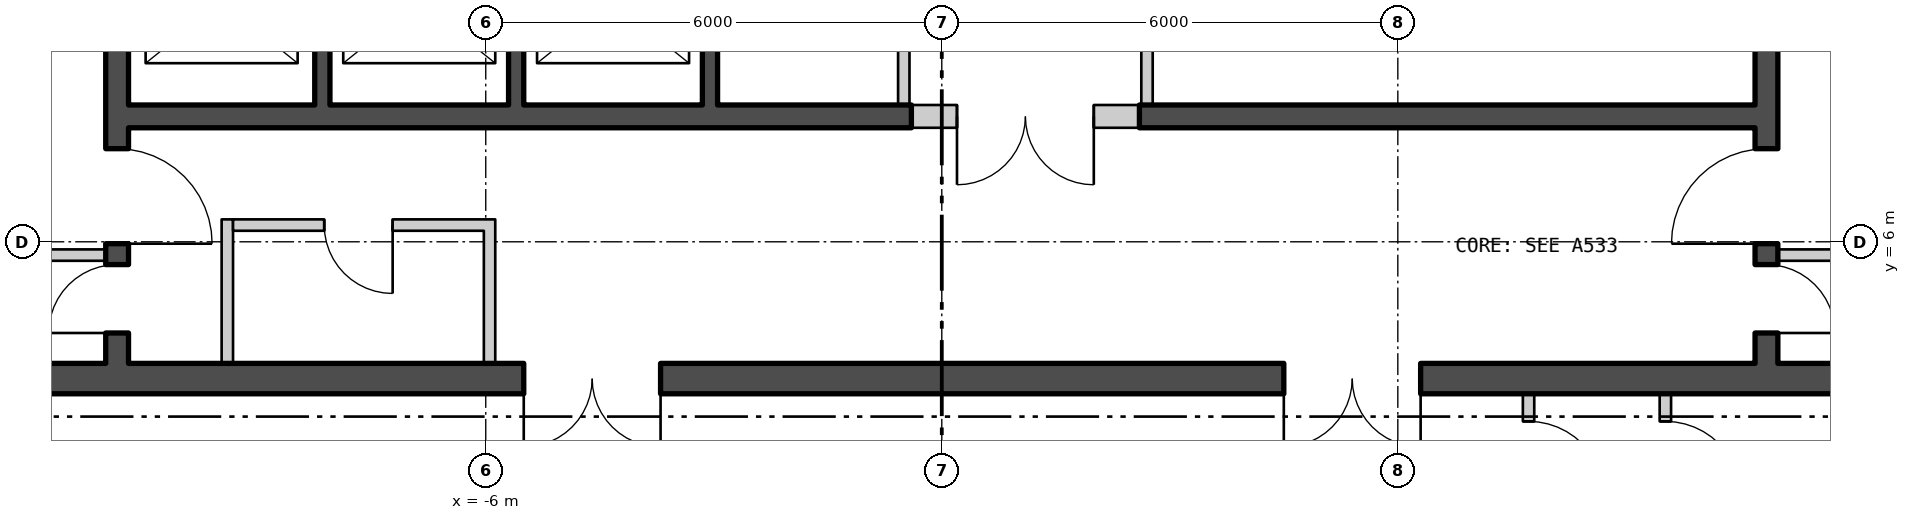
"""IFC4 building model, lengths in metres.
Left out: names, types, materials, properties, quantities, classifications, styles, units other than length and angle.
Written with IfcOpenShell. Run it as: python <this file> out.ifc"""

import sys

from ifc_helpers import new_model, si_unit, direction, frame, frame_2d, origin, place, context, subcontext, project, spatial, polyline, rectangle, outline, extrude, element, fill, save


model = new_model("IFC4")
c1 = context("Model", 3, precision=1e-05, world=origin(), true_north=direction((0.0, 1.0)))
c2 = subcontext(c1, "Body", "Model", "MODEL_VIEW")
j1 = project(units=[si_unit("LENGTHUNIT", "METRE"), si_unit("PLANEANGLEUNIT", "RADIAN")], contexts=[c1])
p1 = place(None, origin())
s1 = spatial("IfcSite", under=j1, at=p1, CompositionType="ELEMENT")
p2 = place(p1, origin())
s2 = spatial("IfcBuilding", under=s1, at=p2, CompositionType="ELEMENT")
p3 = place(p2, frame((0.0, 0.0, 280.5)))
s3 = spatial("IfcBuildingStorey", under=s2, at=p3, CompositionType="ELEMENT", Elevation=280.5)
p4 = place(p3, frame((-25.385, 15.619, -0.18), z_axis=(0.0, 0.0, 1.0), x_axis=(0.500000711659, -0.866024992908, 0.0)))
e1 = element("IfcWall", 1, at=p4, inside=s3, PredefinedType="SOLIDWALL", context=c2, shape_type="SweptSolid", body=[
    extrude(outline(polyline([(-0.13, -0.225), (45.87, -0.225), (45.61, 0.225), (0.13, 0.225), (-0.13, -0.225)])), origin(), (0.0, 0.0, 1.0), 3.68),
])
p5 = place(p4, frame((1.424, 0.0, 1.08)))
e2 = element("IfcOpeningElement", 2, at=p5, cuts=e1, PredefinedType="OPENING", context=c2, shape_type="SweptSolid", body=[
    extrude(rectangle(XDim=2.4, YDim=2.0, at=frame_2d((1.2, 1.0))), frame((0.0, 0.235, 0.0), z_axis=(0.0, -1.0, 0.0), x_axis=(1.0, 0.0, 0.0)), (0.0, 0.0, 1.0), 0.47),
])
p6 = place(p4, frame((5.893, 0.0, 1.08)))
e3 = element("IfcOpeningElement", 3, at=p6, cuts=e1, PredefinedType="OPENING", context=c2, shape_type="SweptSolid", body=[
    extrude(rectangle(XDim=2.4, YDim=2.0, at=frame_2d((1.2, 1.0))), frame((0.0, 0.235, 0.0), z_axis=(0.0, -1.0, 0.0), x_axis=(1.0, 0.0, 0.0)), (0.0, 0.0, 1.0), 0.47),
])
p7 = place(p4, frame((10.401, 0.0, 1.08)))
e4 = element("IfcOpeningElement", 4, at=p7, cuts=e1, PredefinedType="OPENING", context=c2, shape_type="SweptSolid", body=[
    extrude(rectangle(XDim=2.4, YDim=2.0, at=frame_2d((1.2, 1.0))), frame((0.0, 0.235, 0.0), z_axis=(0.0, -1.0, 0.0), x_axis=(1.0, 0.0, 0.0)), (0.0, 0.0, 1.0), 0.47),
])
p8 = place(p4, frame((14.909, 0.0, 1.08)))
e5 = element("IfcOpeningElement", 5, at=p8, cuts=e1, PredefinedType="OPENING", context=c2, shape_type="SweptSolid", body=[
    extrude(rectangle(XDim=2.4, YDim=2.0, at=frame_2d((1.2, 1.0))), frame((0.0, 0.235, 0.0), z_axis=(0.0, -1.0, 0.0), x_axis=(1.0, 0.0, 0.0)), (0.0, 0.0, 1.0), 0.47),
])
p9 = place(p4, frame((19.416, 0.0, 1.08)))
e6 = element("IfcOpeningElement", 6, at=p9, cuts=e1, PredefinedType="OPENING", context=c2, shape_type="SweptSolid", body=[
    extrude(rectangle(XDim=2.4, YDim=2.0, at=frame_2d((1.2, 1.0))), frame((0.0, 0.235, 0.0), z_axis=(0.0, -1.0, 0.0), x_axis=(1.0, 0.0, 0.0)), (0.0, 0.0, 1.0), 0.47),
])
p10 = place(p4, frame((23.924, 0.0, 1.08)))
e7 = element("IfcOpeningElement", 7, at=p10, cuts=e1, PredefinedType="OPENING", context=c2, shape_type="SweptSolid", body=[
    extrude(rectangle(XDim=2.4, YDim=2.0, at=frame_2d((1.2, 1.0))), frame((0.0, 0.235, 0.0), z_axis=(0.0, -1.0, 0.0), x_axis=(1.0, 0.0, 0.0)), (0.0, 0.0, 1.0), 0.47),
])
p11 = place(p4, frame((28.431, 0.0, 1.08)))
e8 = element("IfcOpeningElement", 8, at=p11, cuts=e1, PredefinedType="OPENING", context=c2, shape_type="SweptSolid", body=[
    extrude(rectangle(XDim=2.4, YDim=2.0, at=frame_2d((1.2, 1.0))), frame((0.0, 0.235, 0.0), z_axis=(0.0, -1.0, 0.0), x_axis=(1.0, 0.0, 0.0)), (0.0, 0.0, 1.0), 0.47),
])
p12 = place(p4, frame((32.939, 0.0, 1.08)))
e9 = element("IfcOpeningElement", 9, at=p12, cuts=e1, PredefinedType="OPENING", context=c2, shape_type="SweptSolid", body=[
    extrude(rectangle(XDim=2.4, YDim=2.0, at=frame_2d((1.2, 1.0))), frame((0.0, 0.235, 0.0), z_axis=(0.0, -1.0, 0.0), x_axis=(1.0, 0.0, 0.0)), (0.0, 0.0, 1.0), 0.47),
])
p13 = place(p4, frame((37.447, 0.0, 1.08)))
e10 = element("IfcOpeningElement", 10, at=p13, cuts=e1, PredefinedType="OPENING", context=c2, shape_type="SweptSolid", body=[
    extrude(rectangle(XDim=2.4, YDim=2.0, at=frame_2d((1.2, 1.0))), frame((0.0, 0.235, 0.0), z_axis=(0.0, -1.0, 0.0), x_axis=(1.0, 0.0, 0.0)), (0.0, 0.0, 1.0), 0.47),
])
p14 = place(p4, frame((41.916, 0.0, 1.08)))
e11 = element("IfcOpeningElement", 11, at=p14, cuts=e1, PredefinedType="OPENING", context=c2, shape_type="SweptSolid", body=[
    extrude(rectangle(XDim=2.4, YDim=2.0, at=frame_2d((1.2, 1.0))), frame((0.0, 0.235, 0.0), z_axis=(0.0, -1.0, 0.0), x_axis=(1.0, 0.0, 0.0)), (0.0, 0.0, 1.0), 0.47),
])
p15 = place(p3, frame((2.515, -23.993, -0.18), z_axis=(0.0, 0.0, 1.0), x_axis=(0.500000711659, 0.866024992908, 0.0)))
e12 = element("IfcWall", 12, at=p15, inside=s3, PredefinedType="SOLIDWALL", context=c2, shape_type="SweptSolid", body=[
    extrude(outline(polyline([(-0.13, -0.225), (45.87, -0.225), (45.61, 0.225), (0.13, 0.225), (-0.13, -0.225)])), origin(), (0.0, 0.0, 1.0), 3.68),
])
p16 = place(p15, frame((1.424, 0.0, 1.08)))
e13 = element("IfcOpeningElement", 13, at=p16, cuts=e12, PredefinedType="OPENING", context=c2, shape_type="SweptSolid", body=[
    extrude(rectangle(XDim=2.4, YDim=2.0, at=frame_2d((1.2, 1.0))), frame((0.0, 0.235, 0.0), z_axis=(0.0, -1.0, 0.0), x_axis=(1.0, 0.0, 0.0)), (0.0, 0.0, 1.0), 0.47),
])
p17 = place(p15, frame((5.893, 0.0, 1.08)))
e14 = element("IfcOpeningElement", 14, at=p17, cuts=e12, PredefinedType="OPENING", context=c2, shape_type="SweptSolid", body=[
    extrude(rectangle(XDim=2.4, YDim=2.0, at=frame_2d((1.2, 1.0))), frame((0.0, 0.235, 0.0), z_axis=(0.0, -1.0, 0.0), x_axis=(1.0, 0.0, 0.0)), (0.0, 0.0, 1.0), 0.47),
])
p18 = place(p15, frame((10.401, 0.0, 1.08)))
e15 = element("IfcOpeningElement", 15, at=p18, cuts=e12, PredefinedType="OPENING", context=c2, shape_type="SweptSolid", body=[
    extrude(rectangle(XDim=2.4, YDim=2.0, at=frame_2d((1.2, 1.0))), frame((0.0, 0.235, 0.0), z_axis=(0.0, -1.0, 0.0), x_axis=(1.0, 0.0, 0.0)), (0.0, 0.0, 1.0), 0.47),
])
p19 = place(p15, frame((14.909, 0.0, 1.08)))
e16 = element("IfcOpeningElement", 16, at=p19, cuts=e12, PredefinedType="OPENING", context=c2, shape_type="SweptSolid", body=[
    extrude(rectangle(XDim=2.4, YDim=2.0, at=frame_2d((1.2, 1.0))), frame((0.0, 0.235, 0.0), z_axis=(0.0, -1.0, 0.0), x_axis=(1.0, 0.0, 0.0)), (0.0, 0.0, 1.0), 0.47),
])
p20 = place(p15, frame((19.416, 0.0, 1.08)))
e17 = element("IfcOpeningElement", 17, at=p20, cuts=e12, PredefinedType="OPENING", context=c2, shape_type="SweptSolid", body=[
    extrude(rectangle(XDim=2.4, YDim=2.0, at=frame_2d((1.2, 1.0))), frame((0.0, 0.235, 0.0), z_axis=(0.0, -1.0, 0.0), x_axis=(1.0, 0.0, 0.0)), (0.0, 0.0, 1.0), 0.47),
])
p21 = place(p15, frame((28.431, 0.0, 1.08)))
e18 = element("IfcOpeningElement", 18, at=p21, cuts=e12, PredefinedType="OPENING", context=c2, shape_type="SweptSolid", body=[
    extrude(rectangle(XDim=2.4, YDim=2.0, at=frame_2d((1.2, 1.0))), frame((0.0, 0.235, 0.0), z_axis=(0.0, -1.0, 0.0), x_axis=(1.0, 0.0, 0.0)), (0.0, 0.0, 1.0), 0.47),
])
p22 = place(p15, frame((37.447, 0.0, 1.08)))
e19 = element("IfcOpeningElement", 19, at=p22, cuts=e12, PredefinedType="OPENING", context=c2, shape_type="SweptSolid", body=[
    extrude(rectangle(XDim=2.4, YDim=2.0, at=frame_2d((1.2, 1.0))), frame((0.0, 0.235, 0.0), z_axis=(0.0, -1.0, 0.0), x_axis=(1.0, 0.0, 0.0)), (0.0, 0.0, 1.0), 0.47),
])
p23 = place(p15, frame((41.916, 0.0, 1.08)))
e20 = element("IfcOpeningElement", 20, at=p23, cuts=e12, PredefinedType="OPENING", context=c2, shape_type="SweptSolid", body=[
    extrude(rectangle(XDim=2.4, YDim=2.0, at=frame_2d((1.2, 1.0))), frame((0.0, 0.235, 0.0), z_axis=(0.0, -1.0, 0.0), x_axis=(1.0, 0.0, 0.0)), (0.0, 0.0, 1.0), 0.47),
])
p24 = place(p3, frame((-14.5, 4.2, 0.0), z_axis=(0.0, 0.0, 1.0), x_axis=(1.0, 0.0, 0.0)))
e21 = element("IfcWall", 21, at=p24, inside=s3, PredefinedType="SHEAR", context=c2, shape_type="SweptSolid", body=[
    extrude(rectangle(XDim=29.0, YDim=0.4, at=frame_2d((14.5, 0.0))), origin(), (0.0, 0.0, 1.0), 3.7),
])
p25 = place(p24, frame((9.0, 0.0, 0.0)))
e22 = element("IfcOpeningElement", 22, at=p25, cuts=e21, PredefinedType="OPENING", context=c2, shape_type="SweptSolid", body=[
    extrude(rectangle(XDim=1.8, YDim=2.4, at=frame_2d((0.9, 1.2))), frame((0.0, 0.21, 0.0), z_axis=(0.0, -1.0, 0.0), x_axis=(1.0, 0.0, 0.0)), (0.0, 0.0, 1.0), 0.42),
])
p26 = place(p24, frame((19.0, 0.0, 0.0)))
e23 = element("IfcOpeningElement", 23, at=p26, cuts=e21, PredefinedType="OPENING", context=c2, shape_type="SweptSolid", body=[
    extrude(rectangle(XDim=1.8, YDim=2.4, at=frame_2d((0.9, 1.2))), frame((0.0, 0.21, 0.0), z_axis=(0.0, -1.0, 0.0), x_axis=(1.0, 0.0, 0.0)), (0.0, 0.0, 1.0), 0.42),
])
p27 = place(p3, frame((-10.85, 4.4, 0.0), z_axis=(0.0, 0.0, 1.0), x_axis=(0.0, 1.0, 0.0)))
e24 = element("IfcWall", 24, at=p27, inside=s3, PredefinedType="SHEAR", context=c2, shape_type="SweptSolid", body=[
    extrude(rectangle(XDim=13.2, YDim=0.3, at=frame_2d((6.6, 0.0))), origin(), (0.0, 0.0, 1.0), 3.7),
])
p28 = place(p27, frame((1.575, 0.0, 0.0)))
e25 = element("IfcOpeningElement", 25, at=p28, cuts=e24, PredefinedType="OPENING", context=c2, shape_type="SweptSolid", body=[
    extrude(rectangle(XDim=1.25, YDim=2.1, at=frame_2d((0.625, 1.05))), frame((0.0, 0.16, 0.0), z_axis=(0.0, -1.0, 0.0), x_axis=(1.0, 0.0, 0.0)), (0.0, 0.0, 1.0), 0.32),
])
p29 = place(p27, frame((0.4, 0.0, 0.0)))
e26 = element("IfcOpeningElement", 26, at=p29, cuts=e24, PredefinedType="OPENING", context=c2, shape_type="SweptSolid", body=[
    extrude(rectangle(XDim=0.9, YDim=2.1, at=frame_2d((0.45, 1.05))), frame((0.0, 0.16, 0.0), z_axis=(0.0, -1.0, 0.0), x_axis=(1.0, 0.0, 0.0)), (0.0, 0.0, 1.0), 0.32),
])
p30 = place(p3, frame((10.85, 4.4, 0.0), z_axis=(0.0, 0.0, 1.0), x_axis=(0.0, 1.0, 0.0)))
e27 = element("IfcWall", 27, at=p30, inside=s3, PredefinedType="SHEAR", context=c2, shape_type="SweptSolid", body=[
    extrude(rectangle(XDim=13.2, YDim=0.3, at=frame_2d((6.6, 0.0))), origin(), (0.0, 0.0, 1.0), 3.7),
])
p31 = place(p30, frame((1.575, 0.0, 0.0)))
e28 = element("IfcOpeningElement", 28, at=p31, cuts=e27, PredefinedType="OPENING", context=c2, shape_type="SweptSolid", body=[
    extrude(rectangle(XDim=1.25, YDim=2.1, at=frame_2d((0.625, 1.05))), frame((0.0, 0.16, 0.0), z_axis=(0.0, -1.0, 0.0), x_axis=(1.0, 0.0, 0.0)), (0.0, 0.0, 1.0), 0.32),
])
p32 = place(p30, frame((0.4, 0.0, 0.0)))
e29 = element("IfcOpeningElement", 29, at=p32, cuts=e27, PredefinedType="OPENING", context=c2, shape_type="SweptSolid", body=[
    extrude(rectangle(XDim=0.9, YDim=2.1, at=frame_2d((0.45, 1.05))), frame((0.0, 0.16, 0.0), z_axis=(0.0, -1.0, 0.0), x_axis=(1.0, 0.0, 0.0)), (0.0, 0.0, 1.0), 0.32),
])
p33 = place(p3, frame((-10.7, 7.65, 0.0), z_axis=(0.0, 0.0, 1.0), x_axis=(1.0, 0.0, 0.0)))
e30 = element("IfcWall", 30, at=p33, inside=s3, PredefinedType="SHEAR", context=c2, shape_type="SweptSolid", body=[
    extrude(rectangle(XDim=10.3, YDim=0.3, at=frame_2d((5.15, 0.0))), origin(), (0.0, 0.0, 1.0), 3.7),
])
p34 = place(p3, frame((2.6, 7.65, 0.0), z_axis=(0.0, 0.0, 1.0), x_axis=(1.0, 0.0, 0.0)))
e31 = element("IfcWall", 31, at=p34, inside=s3, PredefinedType="SHEAR", context=c2, shape_type="SweptSolid", body=[
    extrude(rectangle(XDim=8.1, YDim=0.3, at=frame_2d((4.05, 0.0))), origin(), (0.0, 0.0, 1.0), 3.7),
])
for number, where, z_axis, x_axis in (
    (32, (-8.15, 7.8, 0.0), (0.0, 0.0, 1.0), (0.0, 1.0, 0.0)),
    (33, (-5.6, 7.8, 0.0), (0.0, 0.0, 1.0), (0.0, 1.0, 0.0)),
    (34, (-3.05, 7.8, 0.0), (0.0, 0.0, 1.0), (0.0, 1.0, 0.0)),
):
    element("IfcWall", number, at=place(p3, frame(where, z_axis=z_axis, x_axis=x_axis)), inside=s3, PredefinedType="SHEAR", context=c2, shape_type="SweptSolid", body=[
        extrude(rectangle(XDim=2.7, YDim=0.2, at=frame_2d((1.35, 0.0))), origin(), (0.0, 0.0, 1.0), 3.7),
    ])
for number, where, z_axis, x_axis in (
    (35, (-0.5, 7.8, 0.0), (0.0, 0.0, 1.0), (0.0, 1.0, 0.0)),
    (36, (2.7, 7.8, 0.0), (0.0, 0.0, 1.0), (0.0, 1.0, 0.0)),
):
    element("IfcWall", number, at=place(p3, frame(where, z_axis=z_axis, x_axis=x_axis)), inside=s3, PredefinedType="PARTITIONING", context=c2, shape_type="SweptSolid", body=[
        extrude(rectangle(XDim=2.7, YDim=0.15, at=frame_2d((1.35, 0.0))), origin(), (0.0, 0.0, 1.0), 3.7),
    ])
for number, where, z_axis, x_axis in (
    (37, (-14.1, 5.825, 0.0), (0.0, 0.0, 1.0), (1.0, 0.0, 0.0)),
    (38, (11.0, 5.825, 0.0), (0.0, 0.0, 1.0), (1.0, 0.0, 0.0)),
):
    element("IfcWall", number, at=place(p3, frame(where, z_axis=z_axis, x_axis=x_axis)), inside=s3, PredefinedType="PARTITIONING", context=c2, shape_type="SweptSolid", body=[
        extrude(rectangle(XDim=3.1, YDim=0.15, at=frame_2d((1.55, 0.0))), origin(), (0.0, 0.0, 1.0), 3.7),
    ])
for number, where, z_axis, x_axis in (
    (39, (-9.4, 4.4, 0.0), (0.0, 0.0, 1.0), (0.0, 1.0, 0.0)),
    (40, (-5.95, 4.4, 0.0), (0.0, 0.0, 1.0), (0.0, 1.0, 0.0)),
):
    element("IfcWall", number, at=place(p3, frame(where, z_axis=z_axis, x_axis=x_axis)), inside=s3, PredefinedType="PARTITIONING", context=c2, shape_type="SweptSolid", body=[
        extrude(rectangle(XDim=1.895, YDim=0.15, at=frame_2d((0.948, 0.0))), origin(), (0.0, 0.0, 1.0), 3.7),
    ])
p35 = place(p3, frame((-9.325, 6.22, 0.0), z_axis=(0.0, 0.0, 1.0), x_axis=(1.0, 0.0, 0.0)))
e41 = element("IfcWall", 41, at=p35, inside=s3, PredefinedType="PARTITIONING", context=c2, shape_type="SweptSolid", body=[
    extrude(rectangle(XDim=3.3, YDim=0.15, at=frame_2d((1.65, 0.0))), origin(), (0.0, 0.0, 1.0), 3.7),
])
p36 = place(p35, frame((1.2, 0.0, 0.0)))
e42 = element("IfcOpeningElement", 42, at=p36, cuts=e41, PredefinedType="OPENING", context=c2, shape_type="SweptSolid", body=[
    extrude(rectangle(XDim=0.9, YDim=2.1, at=frame_2d((0.45, 1.05))), frame((0.0, 0.085, 0.0), z_axis=(0.0, -1.0, 0.0), x_axis=(1.0, 0.0, 0.0)), (0.0, 0.0, 1.0), 0.17),
])
p37 = place(p3, frame((-0.4, 7.65, 0.0), z_axis=(0.0, 0.0, 1.0), x_axis=(1.0, 0.0, 0.0)))
e43 = element("IfcWall", 43, at=p37, inside=s3, PredefinedType="PARTITIONING", context=c2, shape_type="SweptSolid", body=[
    extrude(rectangle(XDim=3.0, YDim=0.3, at=frame_2d((1.5, 0.0))), origin(), (0.0, 0.0, 1.0), 3.7),
])
p38 = place(p37, frame((0.6, 0.0, 0.0)))
e44 = element("IfcOpeningElement", 44, at=p38, cuts=e43, PredefinedType="OPENING", context=c2, shape_type="SweptSolid", body=[
    extrude(rectangle(XDim=1.8, YDim=2.4, at=frame_2d((0.9, 1.2))), frame((0.0, 0.16, 0.0), z_axis=(0.0, -1.0, 0.0), x_axis=(1.0, 0.0, 0.0)), (0.0, 0.0, 1.0), 0.32),
])
p39 = place(p3, frame((7.72, 2.275, 0.0), z_axis=(0.0, 0.0, 1.0), x_axis=(0.0, 1.0, 0.0)))
e45 = element("IfcWall", 45, at=p39, inside=s3, PredefinedType="PARTITIONING", context=c2, shape_type="SweptSolid", body=[
    extrude(rectangle(XDim=1.725, YDim=0.15, at=frame_2d((0.863, 0.0))), origin(), (0.0, 0.0, 1.0), 3.7),
])
p40 = place(p39, frame((0.362, 0.0, 0.0)))
e46 = element("IfcOpeningElement", 46, at=p40, cuts=e45, PredefinedType="OPENING", context=c2, shape_type="SweptSolid", body=[
    extrude(rectangle(XDim=1.0, YDim=2.1, at=frame_2d((0.5, 1.05))), frame((0.0, 0.085, 0.0), z_axis=(0.0, -1.0, 0.0), x_axis=(1.0, 0.0, 0.0)), (0.0, 0.0, 1.0), 0.17),
])
p41 = place(p3, frame((9.52, 2.275, 0.0), z_axis=(0.0, 0.0, 1.0), x_axis=(0.0, 1.0, 0.0)))
e47 = element("IfcWall", 47, at=p41, inside=s3, PredefinedType="PARTITIONING", context=c2, shape_type="SweptSolid", body=[
    extrude(rectangle(XDim=1.725, YDim=0.15, at=frame_2d((0.863, 0.0))), origin(), (0.0, 0.0, 1.0), 3.2),
])
p42 = place(p41, frame((0.362, 0.0, 0.0)))
e48 = element("IfcOpeningElement", 48, at=p42, cuts=e47, PredefinedType="OPENING", context=c2, shape_type="SweptSolid", body=[
    extrude(rectangle(XDim=1.0, YDim=2.1, at=frame_2d((0.5, 1.05))), frame((0.0, 0.085, 0.0), z_axis=(0.0, -1.0, 0.0), x_axis=(1.0, 0.0, 0.0)), (0.0, 0.0, 1.0), 0.17),
])
p43 = place(p28, origin())
e49 = element("IfcDoor", 49, at=p43, inside=s3, OperationType="SINGLE_SWING_LEFT", PredefinedType="DOOR", context=c2, shape_type="SweptSolid", body=[
    extrude(rectangle(XDim=1.25, YDim=2.1, at=frame_2d((0.625, 1.05))), frame((0.0, 0.025, 0.0), z_axis=(0.0, -1.0, 0.0), x_axis=(1.0, 0.0, 0.0)), (0.0, 0.0, 1.0), 0.05),
])
fill(e25, e49)
p44 = place(p29, origin())
e50 = element("IfcDoor", 50, at=p44, inside=s3, OperationType="SINGLE_SWING_RIGHT", PredefinedType="DOOR", context=c2, shape_type="SweptSolid", body=[
    extrude(rectangle(XDim=0.9, YDim=2.1, at=frame_2d((0.45, 1.05))), frame((0.0, 0.025, 0.0), z_axis=(0.0, -1.0, 0.0), x_axis=(1.0, 0.0, 0.0)), (0.0, 0.0, 1.0), 0.05),
])
fill(e26, e50)
p45 = place(p31, origin())
e51 = element("IfcDoor", 51, at=p45, inside=s3, OperationType="SINGLE_SWING_RIGHT", PredefinedType="DOOR", context=c2, shape_type="SweptSolid", body=[
    extrude(rectangle(XDim=1.25, YDim=2.1, at=frame_2d((0.625, 1.05))), frame((0.0, 0.025, 0.0), z_axis=(0.0, -1.0, 0.0), x_axis=(1.0, 0.0, 0.0)), (0.0, 0.0, 1.0), 0.05),
])
fill(e28, e51)
p46 = place(p32, origin())
e52 = element("IfcDoor", 52, at=p46, inside=s3, OperationType="SINGLE_SWING_LEFT", PredefinedType="DOOR", context=c2, shape_type="SweptSolid", body=[
    extrude(rectangle(XDim=0.9, YDim=2.1, at=frame_2d((0.45, 1.05))), frame((0.0, 0.025, 0.0), z_axis=(0.0, -1.0, 0.0), x_axis=(1.0, 0.0, 0.0)), (0.0, 0.0, 1.0), 0.05),
])
fill(e29, e52)
p47 = place(p36, origin())
e53 = element("IfcDoor", 53, at=p47, inside=s3, OperationType="SINGLE_SWING_RIGHT", PredefinedType="DOOR", context=c2, shape_type="SweptSolid", body=[
    extrude(rectangle(XDim=0.9, YDim=2.1, at=frame_2d((0.45, 1.05))), frame((0.0, 0.025, 0.0), z_axis=(0.0, -1.0, 0.0), x_axis=(1.0, 0.0, 0.0)), (0.0, 0.0, 1.0), 0.05),
])
fill(e42, e53)
p48 = place(p38, origin())
e54 = element("IfcDoor", 54, at=p48, inside=s3, OperationType="DOUBLE_DOOR_SINGLE_SWING", PredefinedType="DOOR", context=c2, shape_type="SweptSolid", body=[
    extrude(rectangle(XDim=1.8, YDim=2.4, at=frame_2d((0.9, 1.2))), frame((0.0, 0.025, 0.0), z_axis=(0.0, -1.0, 0.0), x_axis=(1.0, 0.0, 0.0)), (0.0, 0.0, 1.0), 0.05),
])
fill(e44, e54)
p49 = place(p25, origin())
e55 = element("IfcDoor", 55, at=p49, inside=s3, OperationType="DOUBLE_DOOR_SINGLE_SWING", PredefinedType="DOOR", context=c2, shape_type="SweptSolid", body=[
    extrude(rectangle(XDim=1.8, YDim=2.4, at=frame_2d((0.9, 1.2))), frame((0.0, 0.025, 0.0), z_axis=(0.0, -1.0, 0.0), x_axis=(1.0, 0.0, 0.0)), (0.0, 0.0, 1.0), 0.05),
])
fill(e22, e55)
p50 = place(p26, origin())
e56 = element("IfcDoor", 56, at=p50, inside=s3, OperationType="DOUBLE_DOOR_SINGLE_SWING", PredefinedType="DOOR", context=c2, shape_type="SweptSolid", body=[
    extrude(rectangle(XDim=1.8, YDim=2.4, at=frame_2d((0.9, 1.2))), frame((0.0, 0.025, 0.0), z_axis=(0.0, -1.0, 0.0), x_axis=(1.0, 0.0, 0.0)), (0.0, 0.0, 1.0), 0.05),
])
fill(e23, e56)
p51 = place(p40, origin())
e57 = element("IfcDoor", 57, at=p51, inside=s3, OperationType="SINGLE_SWING_LEFT", PredefinedType="DOOR", context=c2, shape_type="SweptSolid", body=[
    extrude(rectangle(XDim=1.0, YDim=2.1, at=frame_2d((0.5, 1.05))), frame((0.0, 0.025, 0.0), z_axis=(0.0, -1.0, 0.0), x_axis=(1.0, 0.0, 0.0)), (0.0, 0.0, 1.0), 0.05),
])
fill(e46, e57)
p52 = place(p42, origin())
e58 = element("IfcDoor", 58, at=p52, inside=s3, OperationType="SINGLE_SWING_LEFT", PredefinedType="DOOR", context=c2, shape_type="SweptSolid", body=[
    extrude(rectangle(XDim=1.0, YDim=2.1, at=frame_2d((0.5, 1.05))), frame((0.0, 0.025, 0.0), z_axis=(0.0, -1.0, 0.0), x_axis=(1.0, 0.0, 0.0)), (0.0, 0.0, 1.0), 0.05),
])
fill(e48, e58)
save(model, sys.argv[1])
